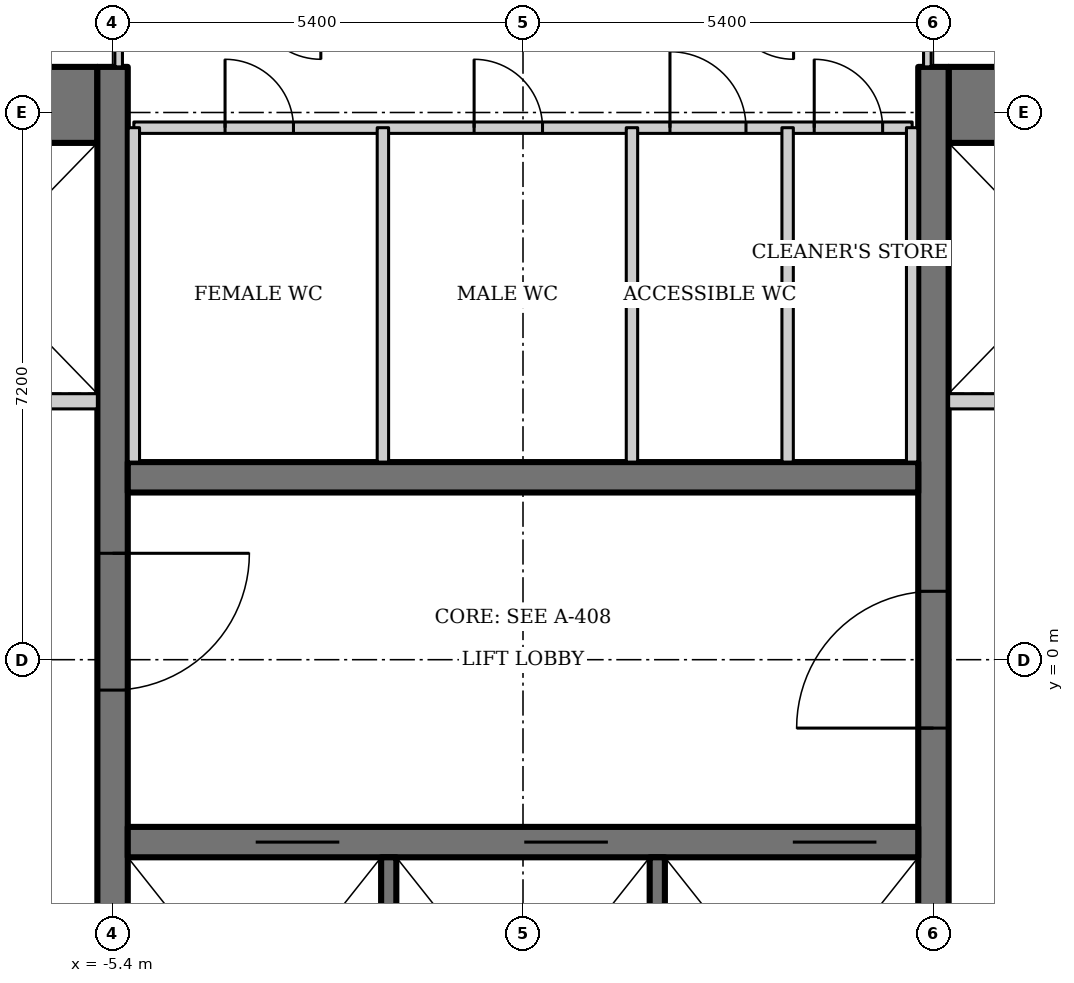
"""IFC4 building model, lengths in metres.
Left out: names, types, materials, properties, quantities, classifications, styles, units other than length and angle.
Written with IfcOpenShell. Run it as: python <this file> out.ifc"""

import sys

from ifc_helpers import new_model, si_unit, direction, frame, frame_2d, origin, place, context, subcontext, project, spatial, rectangle, extrude, element, fill, save


model = new_model("IFC4")
c1 = context("Model", 3, precision=1e-05, world=origin(), true_north=direction((0.0, 1.0)))
c2 = subcontext(c1, "Body", "Model", "MODEL_VIEW")
j1 = project(units=[si_unit("LENGTHUNIT", "METRE"), si_unit("PLANEANGLEUNIT", "RADIAN")], contexts=[c1])
p1 = place(None, origin())
s1 = spatial("IfcSite", under=j1, at=p1, CompositionType="ELEMENT")
p2 = place(p1, origin())
s2 = spatial("IfcBuilding", under=s1, at=p2, CompositionType="ELEMENT")
p3 = place(p2, frame((0.0, 0.0, 224.2)))
s3 = spatial("IfcBuildingStorey", under=s2, at=p3, CompositionType="ELEMENT", Elevation=224.2)
for number, where, z_axis, x_axis in (
    (1, (12.2, 7.3, 0.0), (0.0, 0.0, 1.0), (-1.0, 0.0, 0.0)),
    (2, (-5.6, 7.3, 0.0), (0.0, 0.0, 1.0), (-1.0, 0.0, 0.0)),
):
    element("IfcWall", number, at=place(p3, frame(where, z_axis=z_axis, x_axis=x_axis)), inside=s3, PredefinedType="SHEAR", context=c2, shape_type="SweptSolid", body=[
        extrude(rectangle(XDim=6.6, YDim=1.0, at=frame_2d((3.3, 0.0))), origin(), (0.0, 0.0, 1.0), 4.2),
    ])
p4 = place(p3, frame((5.4, -6.8, 0.0), z_axis=(0.0, 0.0, 1.0), x_axis=(0.0, 1.0, 0.0)))
e3 = element("IfcWall", 3, at=p4, inside=s3, PredefinedType="SHEAR", context=c2, shape_type="SweptSolid", body=[
    extrude(rectangle(XDim=14.6, YDim=0.4, at=frame_2d((7.3, 0.0))), origin(), (0.0, 0.0, 1.0), 4.2),
])
p5 = place(p4, frame((5.9, 0.0, 0.0)))
e4 = element("IfcOpeningElement", 4, at=p5, cuts=e3, PredefinedType="OPENING", context=c2, shape_type="SweptSolid", body=[
    extrude(rectangle(XDim=1.8, YDim=2.1, at=frame_2d((0.9, 1.05))), frame((0.0, 0.21, 0.0), z_axis=(0.0, -1.0, 0.0), x_axis=(1.0, 0.0, 0.0)), (0.0, 0.0, 1.0), 0.42),
])
p6 = place(p3, frame((-5.4, 7.8, 0.0), z_axis=(0.0, 0.0, 1.0), x_axis=(0.0, -1.0, 0.0)))
e5 = element("IfcWall", 5, at=p6, inside=s3, PredefinedType="SHEAR", context=c2, shape_type="SweptSolid", body=[
    extrude(rectangle(XDim=14.6, YDim=0.4, at=frame_2d((7.3, 0.0))), origin(), (0.0, 0.0, 1.0), 4.2),
])
p7 = place(p6, frame((6.4, 0.0, 0.0)))
e6 = element("IfcOpeningElement", 6, at=p7, cuts=e5, PredefinedType="OPENING", context=c2, shape_type="SweptSolid", body=[
    extrude(rectangle(XDim=1.8, YDim=2.1, at=frame_2d((0.9, 1.05))), frame((0.0, 0.21, 0.0), z_axis=(0.0, -1.0, 0.0), x_axis=(1.0, 0.0, 0.0)), (0.0, 0.0, 1.0), 0.42),
])
p8 = place(p3, frame((-5.2, -2.4, 0.0), z_axis=(0.0, 0.0, 1.0), x_axis=(1.0, 0.0, 0.0)))
e7 = element("IfcWall", 7, at=p8, inside=s3, PredefinedType="SHEAR", context=c2, shape_type="SweptSolid", body=[
    extrude(rectangle(XDim=10.4, YDim=0.4, at=frame_2d((5.2, 0.0))), origin(), (0.0, 0.0, 1.0), 4.2),
])
p9 = place(p8, frame((1.683, 0.0, 0.0)))
e8 = element("IfcOpeningElement", 8, at=p9, cuts=e7, PredefinedType="OPENING", context=c2, shape_type="SweptSolid", body=[
    extrude(rectangle(XDim=1.1, YDim=2.2, at=frame_2d((0.55, 1.1))), frame((0.0, 0.21, 0.0), z_axis=(0.0, -1.0, 0.0), x_axis=(1.0, 0.0, 0.0)), (0.0, 0.0, 1.0), 0.42),
])
p10 = place(p8, frame((5.217, 0.0, 0.0)))
e9 = element("IfcOpeningElement", 9, at=p10, cuts=e7, PredefinedType="OPENING", context=c2, shape_type="SweptSolid", body=[
    extrude(rectangle(XDim=1.1, YDim=2.2, at=frame_2d((0.55, 1.1))), frame((0.0, 0.21, 0.0), z_axis=(0.0, -1.0, 0.0), x_axis=(1.0, 0.0, 0.0)), (0.0, 0.0, 1.0), 0.42),
])
p11 = place(p8, frame((8.75, 0.0, 0.0)))
e10 = element("IfcOpeningElement", 10, at=p11, cuts=e7, PredefinedType="OPENING", context=c2, shape_type="SweptSolid", body=[
    extrude(rectangle(XDim=1.1, YDim=2.2, at=frame_2d((0.55, 1.1))), frame((0.0, 0.21, 0.0), z_axis=(0.0, -1.0, 0.0), x_axis=(1.0, 0.0, 0.0)), (0.0, 0.0, 1.0), 0.42),
])
for number, where, z_axis, x_axis in (
    (11, (-1.767, -2.6, 0.0), (0.0, 0.0, 1.0), (0.0, -1.0, 0.0)),
    (12, (1.767, -2.6, 0.0), (0.0, 0.0, 1.0), (0.0, -1.0, 0.0)),
):
    element("IfcWall", number, at=place(p3, frame(where, z_axis=z_axis, x_axis=x_axis)), inside=s3, PredefinedType="SOLIDWALL", context=c2, shape_type="SweptSolid", body=[
        extrude(rectangle(XDim=4.2, YDim=0.2, at=frame_2d((2.1, 0.0))), origin(), (0.0, 0.0, 1.0), 4.2),
    ])
p12 = place(p3, frame((5.2, 2.4, 0.0), z_axis=(0.0, 0.0, 1.0), x_axis=(-1.0, 0.0, 0.0)))
e13 = element("IfcWall", 13, at=p12, inside=s3, PredefinedType="SHEAR", context=c2, shape_type="SweptSolid", body=[
    extrude(rectangle(XDim=10.4, YDim=0.4, at=frame_2d((5.2, 0.0))), origin(), (0.0, 0.0, 1.0), 4.2),
])
p13 = place(p3, frame((12.2, 3.4, 0.0), z_axis=(0.0, 0.0, 1.0), x_axis=(-1.0, 0.0, 0.0)))
e14 = element("IfcWall", 14, at=p13, inside=s3, PredefinedType="SOLIDWALL", context=c2, shape_type="SweptSolid", body=[
    extrude(rectangle(XDim=6.6, YDim=0.2, at=frame_2d((3.3, 0.0))), origin(), (0.0, 0.0, 1.0), 4.2),
])
p14 = place(p13, frame((4.45, 0.0, 0.0)))
e15 = element("IfcOpeningElement", 15, at=p14, cuts=e14, PredefinedType="OPENING", context=c2, shape_type="SweptSolid", body=[
    extrude(rectangle(XDim=1.1, YDim=2.2, at=frame_2d((0.55, 1.1))), frame((0.0, 0.11, 0.0), z_axis=(0.0, -1.0, 0.0), x_axis=(1.0, 0.0, 0.0)), (0.0, 0.0, 1.0), 0.22),
])
p15 = place(p13, frame((0.9, 0.0, 0.0)))
e16 = element("IfcOpeningElement", 16, at=p15, cuts=e14, PredefinedType="OPENING", context=c2, shape_type="SweptSolid", body=[
    extrude(rectangle(XDim=1.4, YDim=2.2, at=frame_2d((0.7, 1.1))), frame((0.0, 0.11, 0.0), z_axis=(0.0, -1.0, 0.0), x_axis=(1.0, 0.0, 0.0)), (0.0, 0.0, 1.0), 0.22),
])
p16 = place(p3, frame((-12.2, 3.4, 0.0), z_axis=(0.0, 0.0, 1.0), x_axis=(1.0, 0.0, 0.0)))
e17 = element("IfcWall", 17, at=p16, inside=s3, PredefinedType="SOLIDWALL", context=c2, shape_type="SweptSolid", body=[
    extrude(rectangle(XDim=6.6, YDim=0.2, at=frame_2d((3.3, 0.0))), origin(), (0.0, 0.0, 1.0), 4.2),
])
p17 = place(p16, frame((1.05, 0.0, 0.0)))
e18 = element("IfcOpeningElement", 18, at=p17, cuts=e17, PredefinedType="OPENING", context=c2, shape_type="SweptSolid", body=[
    extrude(rectangle(XDim=1.1, YDim=2.2, at=frame_2d((0.55, 1.1))), frame((0.0, 0.11, 0.0), z_axis=(0.0, -1.0, 0.0), x_axis=(1.0, 0.0, 0.0)), (0.0, 0.0, 1.0), 0.22),
])
p18 = place(p16, frame((4.3, 0.0, 0.0)))
e19 = element("IfcOpeningElement", 19, at=p18, cuts=e17, PredefinedType="OPENING", context=c2, shape_type="SweptSolid", body=[
    extrude(rectangle(XDim=1.4, YDim=2.2, at=frame_2d((0.7, 1.1))), frame((0.0, 0.11, 0.0), z_axis=(0.0, -1.0, 0.0), x_axis=(1.0, 0.0, 0.0)), (0.0, 0.0, 1.0), 0.22),
])
p19 = place(p3, frame((-5.12, 7.0, 0.0), z_axis=(0.0, 0.0, 1.0), x_axis=(1.0, 0.0, 0.0)))
e20 = element("IfcWall", 20, at=p19, inside=s3, PredefinedType="SOLIDWALL", context=c2, shape_type="SweptSolid", body=[
    extrude(rectangle(XDim=10.24, YDim=0.15, at=frame_2d((5.12, 0.0))), origin(), (0.0, 0.0, 1.0), 4.05),
])
p20 = place(p19, frame((1.2, 0.0, 0.0)))
e21 = element("IfcOpeningElement", 21, at=p20, cuts=e20, PredefinedType="OPENING", context=c2, shape_type="SweptSolid", body=[
    extrude(rectangle(XDim=0.9, YDim=2.1, at=frame_2d((0.45, 1.05))), frame((0.0, 0.085, 0.0), z_axis=(0.0, -1.0, 0.0), x_axis=(1.0, 0.0, 0.0)), (0.0, 0.0, 1.0), 0.17),
])
p21 = place(p19, frame((4.477, 0.0, 0.0)))
e22 = element("IfcOpeningElement", 22, at=p21, cuts=e20, PredefinedType="OPENING", context=c2, shape_type="SweptSolid", body=[
    extrude(rectangle(XDim=0.9, YDim=2.1, at=frame_2d((0.45, 1.05))), frame((0.0, 0.085, 0.0), z_axis=(0.0, -1.0, 0.0), x_axis=(1.0, 0.0, 0.0)), (0.0, 0.0, 1.0), 0.17),
])
p22 = place(p19, frame((7.054, 0.0, 0.0)))
e23 = element("IfcOpeningElement", 23, at=p22, cuts=e20, PredefinedType="OPENING", context=c2, shape_type="SweptSolid", body=[
    extrude(rectangle(XDim=1.0, YDim=2.1, at=frame_2d((0.5, 1.05))), frame((0.0, 0.085, 0.0), z_axis=(0.0, -1.0, 0.0), x_axis=(1.0, 0.0, 0.0)), (0.0, 0.0, 1.0), 0.17),
])
p23 = place(p19, frame((8.952, 0.0, 0.0)))
e24 = element("IfcOpeningElement", 24, at=p23, cuts=e20, PredefinedType="OPENING", context=c2, shape_type="SweptSolid", body=[
    extrude(rectangle(XDim=0.9, YDim=2.1, at=frame_2d((0.45, 1.05))), frame((0.0, 0.085, 0.0), z_axis=(0.0, -1.0, 0.0), x_axis=(1.0, 0.0, 0.0)), (0.0, 0.0, 1.0), 0.17),
])
for number, where, z_axis, x_axis in (
    (25, (-5.12, 2.6, 0.0), (0.0, 0.0, 1.0), (0.0, 1.0, 0.0)),
    (26, (5.12, 2.6, 0.0), (0.0, 0.0, 1.0), (0.0, 1.0, 0.0)),
    (27, (-1.843, 2.6, 0.0), (0.0, 0.0, 1.0), (0.0, 1.0, 0.0)),
):
    element("IfcWall", number, at=place(p3, frame(where, z_axis=z_axis, x_axis=x_axis)), inside=s3, PredefinedType="SOLIDWALL", context=c2, shape_type="SweptSolid", body=[
        extrude(rectangle(XDim=4.4, YDim=0.15, at=frame_2d((2.2, 0.0))), origin(), (0.0, 0.0, 1.0), 4.05),
    ])
p24 = place(p3, frame((1.434, 2.6, 0.0), z_axis=(0.0, 0.0, 1.0), x_axis=(0.0, 1.0, 0.0)))
e28 = element("IfcWall", 28, at=p24, inside=s3, PredefinedType="SOLIDWALL", context=c2, shape_type="SweptSolid", body=[
    extrude(rectangle(XDim=4.4, YDim=0.15, at=frame_2d((2.2, 0.0))), origin(), (0.0, 0.0, 1.0), 3.108),
])
p25 = place(p3, frame((3.482, 2.6, 0.0), z_axis=(0.0, 0.0, 1.0), x_axis=(0.0, 1.0, 0.0)))
e29 = element("IfcWall", 29, at=p25, inside=s3, PredefinedType="SOLIDWALL", context=c2, shape_type="SweptSolid", body=[
    extrude(rectangle(XDim=4.4, YDim=0.15, at=frame_2d((2.2, 0.0))), origin(), (0.0, 0.0, 1.0), 4.05),
])
for number, where, z_axis, x_axis in (
    (30, (5.32, 7.8, 0.0), (0.0, 0.0, 1.0), (0.0, 1.0, 0.0)),
    (31, (-5.32, 8.8, 0.0), (0.0, 0.0, 1.0), (0.0, -1.0, 0.0)),
):
    element("IfcWall", number, at=place(p3, frame(where, z_axis=z_axis, x_axis=x_axis)), inside=s3, PredefinedType="PARTITIONING", context=c2, shape_type="SweptSolid", body=[
        extrude(rectangle(XDim=1.0, YDim=0.1, at=frame_2d((0.5, 0.0))), origin(), (0.0, 0.0, 1.0), 4.05),
    ])
p26 = place(p5, origin())
e32 = element("IfcDoor", 32, at=p26, inside=s3, OperationType="DOUBLE_DOOR_DOUBLE_SWING", PredefinedType="DOOR", context=c2, shape_type="SweptSolid", body=[
    extrude(rectangle(XDim=1.8, YDim=2.1, at=frame_2d((0.9, 1.05))), frame((0.0, 0.025, 0.0), z_axis=(0.0, -1.0, 0.0), x_axis=(1.0, 0.0, 0.0)), (0.0, 0.0, 1.0), 0.05),
])
fill(e4, e32)
p27 = place(p7, origin())
e33 = element("IfcDoor", 33, at=p27, inside=s3, OperationType="DOUBLE_DOOR_DOUBLE_SWING", PredefinedType="DOOR", context=c2, shape_type="SweptSolid", body=[
    extrude(rectangle(XDim=1.8, YDim=2.1, at=frame_2d((0.9, 1.05))), frame((0.0, 0.025, 0.0), z_axis=(0.0, -1.0, 0.0), x_axis=(1.0, 0.0, 0.0)), (0.0, 0.0, 1.0), 0.05),
])
fill(e6, e33)
p28 = place(p9, origin())
e34 = element("IfcDoor", 34, at=p28, inside=s3, OperationType="DOUBLE_DOOR_SLIDING", PredefinedType="DOOR", context=c2, shape_type="SweptSolid", body=[
    extrude(rectangle(XDim=1.1, YDim=2.2, at=frame_2d((0.55, 1.1))), frame((0.0, 0.025, 0.0), z_axis=(0.0, -1.0, 0.0), x_axis=(1.0, 0.0, 0.0)), (0.0, 0.0, 1.0), 0.05),
])
fill(e8, e34)
p29 = place(p10, origin())
e35 = element("IfcDoor", 35, at=p29, inside=s3, OperationType="DOUBLE_DOOR_SLIDING", PredefinedType="DOOR", context=c2, shape_type="SweptSolid", body=[
    extrude(rectangle(XDim=1.1, YDim=2.2, at=frame_2d((0.55, 1.1))), frame((0.0, 0.025, 0.0), z_axis=(0.0, -1.0, 0.0), x_axis=(1.0, 0.0, 0.0)), (0.0, 0.0, 1.0), 0.05),
])
fill(e9, e35)
p30 = place(p11, origin())
e36 = element("IfcDoor", 36, at=p30, inside=s3, OperationType="DOUBLE_DOOR_SLIDING", PredefinedType="DOOR", context=c2, shape_type="SweptSolid", body=[
    extrude(rectangle(XDim=1.1, YDim=2.2, at=frame_2d((0.55, 1.1))), frame((0.0, 0.025, 0.0), z_axis=(0.0, -1.0, 0.0), x_axis=(1.0, 0.0, 0.0)), (0.0, 0.0, 1.0), 0.05),
])
fill(e10, e36)
p31 = place(p20, origin())
e37 = element("IfcDoor", 37, at=p31, inside=s3, OperationType="SINGLE_SWING_LEFT", PredefinedType="DOOR", context=c2, shape_type="SweptSolid", body=[
    extrude(rectangle(XDim=0.9, YDim=2.1, at=frame_2d((0.45, 1.05))), frame((0.0, 0.025, 0.0), z_axis=(0.0, -1.0, 0.0), x_axis=(1.0, 0.0, 0.0)), (0.0, 0.0, 1.0), 0.05),
])
fill(e21, e37)
p32 = place(p21, origin())
e38 = element("IfcDoor", 38, at=p32, inside=s3, OperationType="SINGLE_SWING_LEFT", PredefinedType="DOOR", context=c2, shape_type="SweptSolid", body=[
    extrude(rectangle(XDim=0.9, YDim=2.1, at=frame_2d((0.45, 1.05))), frame((0.0, 0.025, 0.0), z_axis=(0.0, -1.0, 0.0), x_axis=(1.0, 0.0, 0.0)), (0.0, 0.0, 1.0), 0.05),
])
fill(e22, e38)
p33 = place(p22, origin())
e39 = element("IfcDoor", 39, at=p33, inside=s3, OperationType="SINGLE_SWING_LEFT", PredefinedType="DOOR", context=c2, shape_type="SweptSolid", body=[
    extrude(rectangle(XDim=1.0, YDim=2.1, at=frame_2d((0.5, 1.05))), frame((0.0, 0.025, 0.0), z_axis=(0.0, -1.0, 0.0), x_axis=(1.0, 0.0, 0.0)), (0.0, 0.0, 1.0), 0.05),
])
fill(e23, e39)
p34 = place(p23, origin())
e40 = element("IfcDoor", 40, at=p34, inside=s3, OperationType="SINGLE_SWING_LEFT", PredefinedType="DOOR", context=c2, shape_type="SweptSolid", body=[
    extrude(rectangle(XDim=0.9, YDim=2.1, at=frame_2d((0.45, 1.05))), frame((0.0, 0.025, 0.0), z_axis=(0.0, -1.0, 0.0), x_axis=(1.0, 0.0, 0.0)), (0.0, 0.0, 1.0), 0.05),
])
fill(e24, e40)
save(model, sys.argv[1])
